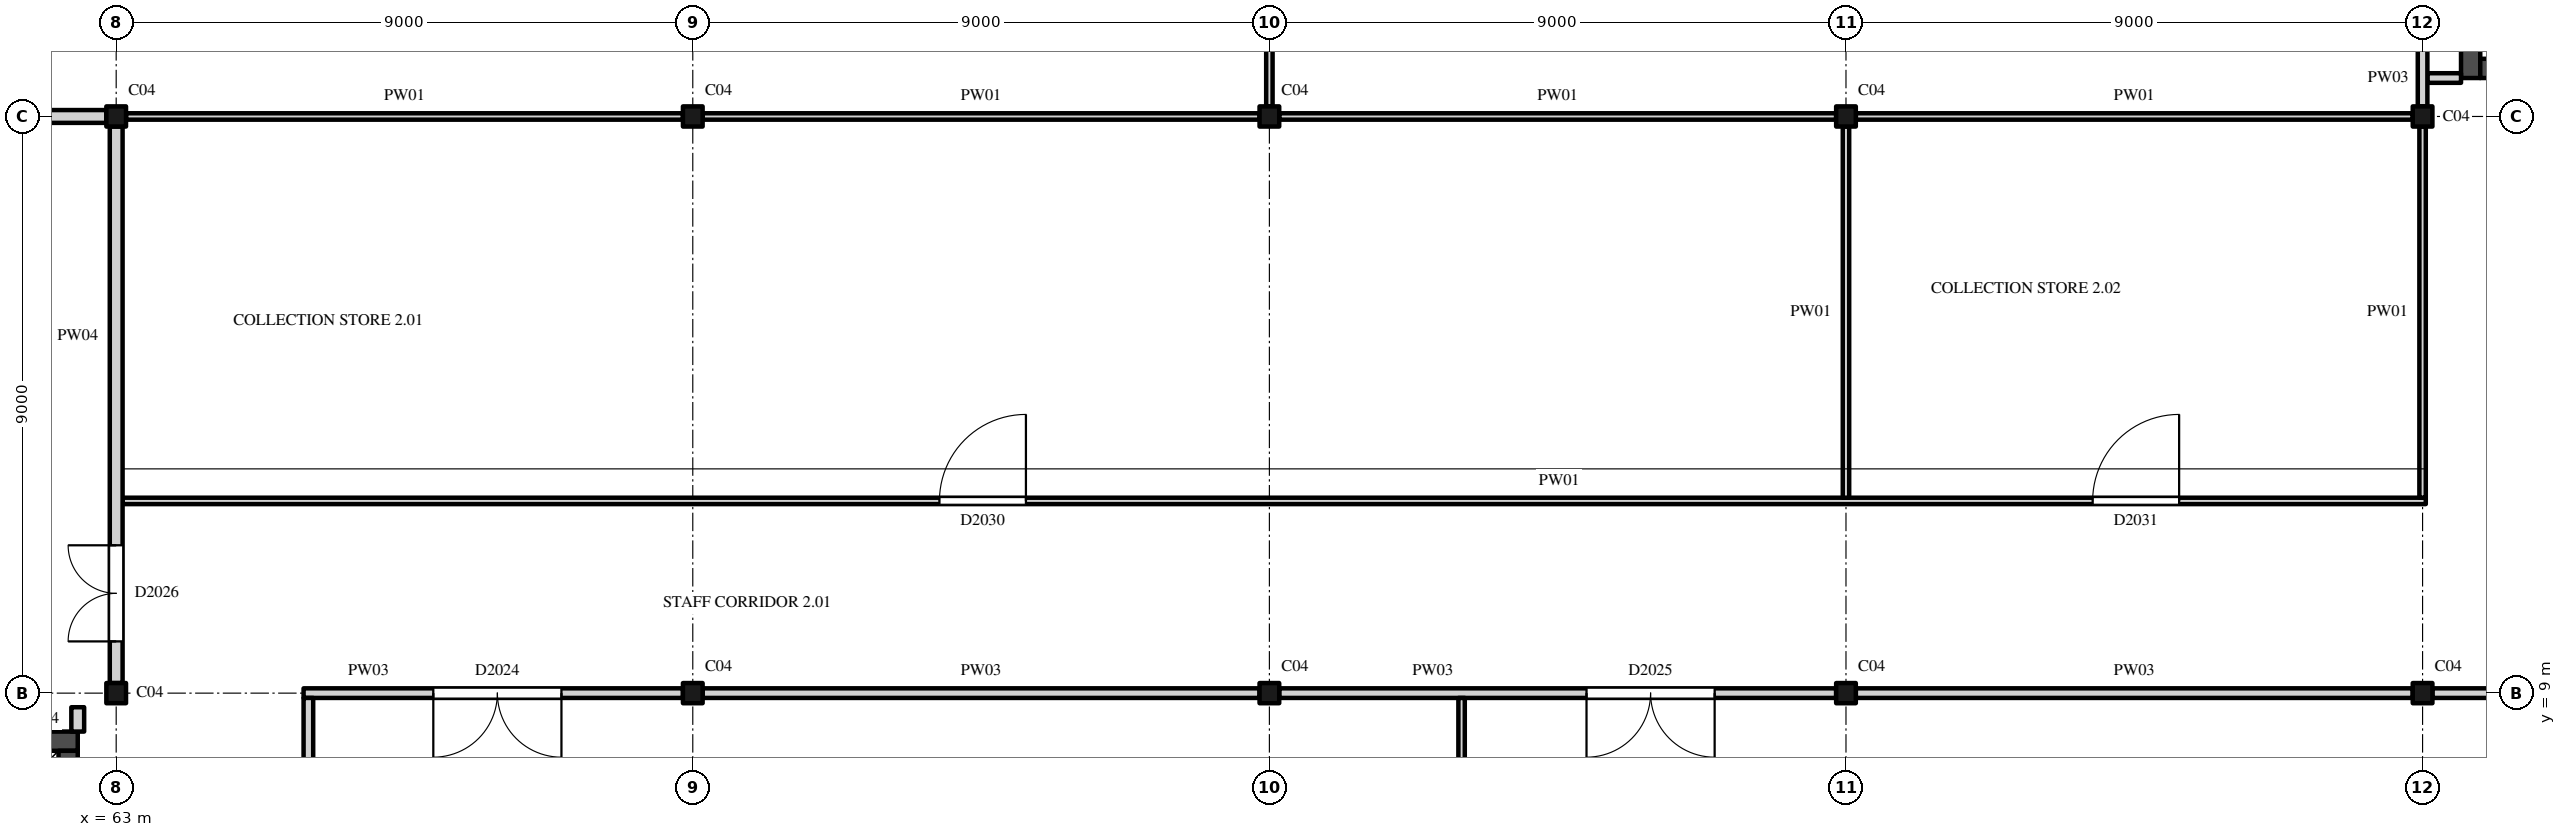
"""IFC4 building model, lengths in metres.
Left out: names, types, materials, properties, quantities, classifications, styles, units other than length and angle.
Written with IfcOpenShell. Run it as: python <this file> out.ifc"""

import sys

from ifc_helpers import new_model, si_unit, direction, frame, frame_2d, origin, origin_2d, place, context, subcontext, project, spatial, rectangle, i_section, extrude, element, fill, save


model = new_model("IFC4")
c1 = context("Model", 3, precision=1e-05, world=origin(), true_north=direction((0.0, 1.0)))
c2 = subcontext(c1, "Body", "Model", "MODEL_VIEW")
j1 = project(units=[si_unit("LENGTHUNIT", "METRE"), si_unit("PLANEANGLEUNIT", "RADIAN")], contexts=[c1])
p1 = place(None, origin())
s1 = spatial("IfcSite", under=j1, at=p1, CompositionType="ELEMENT")
p2 = place(p1, origin())
s2 = spatial("IfcBuilding", under=s1, at=p2, CompositionType="ELEMENT")
p3 = place(p2, frame((0.0, 0.0, 11.0)))
s3 = spatial("IfcBuildingStorey", under=s2, at=p3, CompositionType="ELEMENT", Elevation=11.0)
for number, where, z_axis, x_axis in (
    (1, (63.0, 9.0, 0.0), (0.0, 0.0, 1.0), (1.0, 0.0, 0.0)),
    (2, (72.0, 9.0, 0.0), (0.0, 0.0, 1.0), (1.0, 0.0, 0.0)),
    (3, (81.0, 9.0, 0.0), (0.0, 0.0, 1.0), (1.0, 0.0, 0.0)),
    (4, (90.0, 9.0, 0.0), (0.0, 0.0, 1.0), (1.0, 0.0, 0.0)),
    (5, (99.0, 9.0, 0.0), (0.0, 0.0, 1.0), (1.0, 0.0, 0.0)),
    (6, (63.0, 18.0, 0.0), (0.0, 0.0, 1.0), (1.0, 0.0, 0.0)),
    (7, (72.0, 18.0, 0.0), (0.0, 0.0, 1.0), (1.0, 0.0, 0.0)),
    (8, (81.0, 18.0, 0.0), (0.0, 0.0, 1.0), (1.0, 0.0, 0.0)),
    (9, (90.0, 18.0, 0.0), (0.0, 0.0, 1.0), (1.0, 0.0, 0.0)),
    (10, (99.0, 18.0, 0.0), (0.0, 0.0, 1.0), (1.0, 0.0, 0.0)),
):
    element("IfcColumn", number, at=place(p3, frame(where, z_axis=z_axis, x_axis=x_axis)), inside=s3, PredefinedType="COLUMN", context=c2, shape_type="SweptSolid", body=[
        extrude(i_section(OverallWidth=0.307, OverallDepth=0.315, WebThickness=0.012, FlangeThickness=0.019, FilletRadius=0.017, at=origin_2d()), origin(), (0.0, 0.0, 1.0), 5.0),
    ])
p4 = place(p3, frame((54.3, 8.25, 0.0), z_axis=(0.0, 0.0, 1.0), x_axis=(1.0, 0.0, 0.0)))
e11 = element("IfcWall", 11, at=p4, inside=s3, PredefinedType="SHEAR", context=c2, shape_type="SweptSolid", body=[
    extrude(rectangle(XDim=8.1, YDim=0.3, at=frame_2d((4.05, 0.0))), origin(), (0.0, 0.0, 1.0), 4.825),
])
p5 = place(p3, frame((62.25, 0.3, 0.0), z_axis=(0.0, 0.0, 1.0), x_axis=(0.0, 1.0, 0.0)))
e12 = element("IfcWall", 12, at=p5, inside=s3, PredefinedType="SHEAR", context=c2, shape_type="SweptSolid", body=[
    extrude(rectangle(XDim=7.8, YDim=0.3, at=frame_2d((3.9, 0.0))), origin(), (0.0, 0.0, 1.0), 4.825),
])
p6 = place(p5, frame((3.6, 0.0, 0.0)))
e13 = element("IfcOpeningElement", 13, at=p6, cuts=e12, PredefinedType="OPENING", context=c2, shape_type="SweptSolid", body=[
    extrude(rectangle(XDim=1.2, YDim=2.1, at=frame_2d((0.6, 1.05))), frame((0.0, 0.16, 0.0), z_axis=(0.0, -1.0, 0.0), x_axis=(1.0, 0.0, 0.0)), (0.0, 0.0, 1.0), 0.32),
])
p7 = place(p3, frame((99.75, 18.6, 0.0), z_axis=(0.0, 0.0, 1.0), x_axis=(0.0, 1.0, 0.0)))
e14 = element("IfcWall", 14, at=p7, inside=s3, PredefinedType="SHEAR", context=c2, shape_type="SweptSolid", body=[
    extrude(rectangle(XDim=4.8, YDim=0.3, at=frame_2d((2.4, 0.0))), origin(), (0.0, 0.0, 1.0), 4.825),
])
p8 = place(p3, frame((99.9, 18.75, 0.0), z_axis=(0.0, 0.0, 1.0), x_axis=(1.0, 0.0, 0.0)))
e15 = element("IfcWall", 15, at=p8, inside=s3, PredefinedType="SHEAR", context=c2, shape_type="SweptSolid", body=[
    extrude(rectangle(XDim=3.45, YDim=0.3, at=frame_2d((1.725, 0.0))), origin(), (0.0, 0.0, 1.0), 4.825),
])
p9 = place(p8, frame((0.6, 0.0, 0.0)))
e16 = element("IfcOpeningElement", 16, at=p9, cuts=e15, PredefinedType="OPENING", context=c2, shape_type="SweptSolid", body=[
    extrude(rectangle(XDim=2.1, YDim=2.4, at=frame_2d((1.05, 1.2))), frame((0.0, 0.16, 0.0), z_axis=(0.0, -1.0, 0.0), x_axis=(1.0, 0.0, 0.0)), (0.0, 0.0, 1.0), 0.32),
])
for number, where, z_axis, x_axis in (
    (17, (64.5, 11.325, 5.0), (0.0, 0.0, 1.0), (1.0, 0.0, 0.0)),
    (18, (64.5, 15.675, 5.0), (0.0, 0.0, 1.0), (1.0, 0.0, 0.0)),
):
    element("IfcWall", number, at=place(p3, frame(where, z_axis=z_axis, x_axis=x_axis)), inside=s3, PredefinedType="PARAPET", context=c2, shape_type="SweptSolid", body=[
        extrude(rectangle(XDim=6.0, YDim=0.15, at=frame_2d((3.0, 0.0))), origin(), (0.0, 0.0, 1.0), 0.5),
    ])
for number, where, z_axis, x_axis in (
    (19, (64.575, 11.4, 5.0), (0.0, 0.0, 1.0), (0.0, 1.0, 0.0)),
    (20, (70.425, 11.4, 5.0), (0.0, 0.0, 1.0), (0.0, 1.0, 0.0)),
):
    element("IfcWall", number, at=place(p3, frame(where, z_axis=z_axis, x_axis=x_axis)), inside=s3, PredefinedType="PARAPET", context=c2, shape_type="SweptSolid", body=[
        extrude(rectangle(XDim=4.2, YDim=0.15, at=frame_2d((2.1, 0.0))), origin(), (0.0, 0.0, 1.0), 0.5),
    ])
for number, where, z_axis, x_axis in (
    (21, (73.5, 11.325, 5.0), (0.0, 0.0, 1.0), (1.0, 0.0, 0.0)),
    (22, (73.5, 15.675, 5.0), (0.0, 0.0, 1.0), (1.0, 0.0, 0.0)),
):
    element("IfcWall", number, at=place(p3, frame(where, z_axis=z_axis, x_axis=x_axis)), inside=s3, PredefinedType="PARAPET", context=c2, shape_type="SweptSolid", body=[
        extrude(rectangle(XDim=6.0, YDim=0.15, at=frame_2d((3.0, 0.0))), origin(), (0.0, 0.0, 1.0), 0.5),
    ])
for number, where, z_axis, x_axis in (
    (23, (73.575, 11.4, 5.0), (0.0, 0.0, 1.0), (0.0, 1.0, 0.0)),
    (24, (79.425, 11.4, 5.0), (0.0, 0.0, 1.0), (0.0, 1.0, 0.0)),
):
    element("IfcWall", number, at=place(p3, frame(where, z_axis=z_axis, x_axis=x_axis)), inside=s3, PredefinedType="PARAPET", context=c2, shape_type="SweptSolid", body=[
        extrude(rectangle(XDim=4.2, YDim=0.15, at=frame_2d((2.1, 0.0))), origin(), (0.0, 0.0, 1.0), 0.5),
    ])
for number, where, z_axis, x_axis in (
    (25, (82.5, 11.325, 5.0), (0.0, 0.0, 1.0), (1.0, 0.0, 0.0)),
    (26, (82.5, 15.675, 5.0), (0.0, 0.0, 1.0), (1.0, 0.0, 0.0)),
):
    element("IfcWall", number, at=place(p3, frame(where, z_axis=z_axis, x_axis=x_axis)), inside=s3, PredefinedType="PARAPET", context=c2, shape_type="SweptSolid", body=[
        extrude(rectangle(XDim=6.0, YDim=0.15, at=frame_2d((3.0, 0.0))), origin(), (0.0, 0.0, 1.0), 0.5),
    ])
for number, where, z_axis, x_axis in (
    (27, (82.575, 11.4, 5.0), (0.0, 0.0, 1.0), (0.0, 1.0, 0.0)),
    (28, (88.425, 11.4, 5.0), (0.0, 0.0, 1.0), (0.0, 1.0, 0.0)),
):
    element("IfcWall", number, at=place(p3, frame(where, z_axis=z_axis, x_axis=x_axis)), inside=s3, PredefinedType="PARAPET", context=c2, shape_type="SweptSolid", body=[
        extrude(rectangle(XDim=4.2, YDim=0.15, at=frame_2d((2.1, 0.0))), origin(), (0.0, 0.0, 1.0), 0.5),
    ])
for number, where, z_axis, x_axis in (
    (29, (91.5, 11.325, 5.0), (0.0, 0.0, 1.0), (1.0, 0.0, 0.0)),
    (30, (91.5, 15.675, 5.0), (0.0, 0.0, 1.0), (1.0, 0.0, 0.0)),
):
    element("IfcWall", number, at=place(p3, frame(where, z_axis=z_axis, x_axis=x_axis)), inside=s3, PredefinedType="PARAPET", context=c2, shape_type="SweptSolid", body=[
        extrude(rectangle(XDim=6.0, YDim=0.15, at=frame_2d((3.0, 0.0))), origin(), (0.0, 0.0, 1.0), 0.5),
    ])
for number, where, z_axis, x_axis in (
    (31, (91.575, 11.4, 5.0), (0.0, 0.0, 1.0), (0.0, 1.0, 0.0)),
    (32, (97.425, 11.4, 5.0), (0.0, 0.0, 1.0), (0.0, 1.0, 0.0)),
):
    element("IfcWall", number, at=place(p3, frame(where, z_axis=z_axis, x_axis=x_axis)), inside=s3, PredefinedType="PARAPET", context=c2, shape_type="SweptSolid", body=[
        extrude(rectangle(XDim=4.2, YDim=0.15, at=frame_2d((2.1, 0.0))), origin(), (0.0, 0.0, 1.0), 0.5),
    ])
p10 = place(p3, frame((65.925, 9.0, 0.0), z_axis=(0.0, 0.0, 1.0), x_axis=(1.0, 0.0, 0.0)))
e33 = element("IfcWall", 33, at=p10, inside=s3, PredefinedType="PARTITIONING", context=c2, shape_type="SweptSolid", body=[
    extrude(rectangle(XDim=5.921, YDim=0.15, at=frame_2d((2.961, 0.0))), origin(), (0.0, 0.0, 1.0), 4.419),
])
p11 = place(p10, frame((2.025, 0.0, 0.0)))
e34 = element("IfcOpeningElement", 34, at=p11, cuts=e33, PredefinedType="OPENING", context=c2, shape_type="SweptSolid", body=[
    extrude(rectangle(XDim=2.0, YDim=2.4, at=frame_2d((1.0, 1.2))), frame((0.0, 0.085, 0.0), z_axis=(0.0, -1.0, 0.0), x_axis=(1.0, 0.0, 0.0)), (0.0, 0.0, 1.0), 0.17),
])
p12 = place(p3, frame((72.154, 9.0, 0.0), z_axis=(0.0, 0.0, 1.0), x_axis=(1.0, 0.0, 0.0)))
e35 = element("IfcWall", 35, at=p12, inside=s3, PredefinedType="PARTITIONING", context=c2, shape_type="SweptSolid", body=[
    extrude(rectangle(XDim=8.693, YDim=0.15, at=frame_2d((4.346, 0.0))), origin(), (0.0, 0.0, 1.0), 4.419),
])
p13 = place(p3, frame((81.154, 9.0, 0.0), z_axis=(0.0, 0.0, 1.0), x_axis=(1.0, 0.0, 0.0)))
e36 = element("IfcWall", 36, at=p13, inside=s3, PredefinedType="PARTITIONING", context=c2, shape_type="SweptSolid", body=[
    extrude(rectangle(XDim=8.693, YDim=0.15, at=frame_2d((4.346, 0.0))), origin(), (0.0, 0.0, 1.0), 4.419),
])
p14 = place(p13, frame((4.796, 0.0, 0.0)))
e37 = element("IfcOpeningElement", 37, at=p14, cuts=e36, PredefinedType="OPENING", context=c2, shape_type="SweptSolid", body=[
    extrude(rectangle(XDim=2.0, YDim=2.4, at=frame_2d((1.0, 1.2))), frame((0.0, 0.085, 0.0), z_axis=(0.0, -1.0, 0.0), x_axis=(1.0, 0.0, 0.0)), (0.0, 0.0, 1.0), 0.17),
])
p15 = place(p3, frame((90.154, 9.0, 0.0), z_axis=(0.0, 0.0, 1.0), x_axis=(1.0, 0.0, 0.0)))
e38 = element("IfcWall", 38, at=p15, inside=s3, PredefinedType="PARTITIONING", context=c2, shape_type="SweptSolid", body=[
    extrude(rectangle(XDim=8.693, YDim=0.15, at=frame_2d((4.346, 0.0))), origin(), (0.0, 0.0, 1.0), 4.419),
])
p16 = place(p3, frame((99.154, 9.0, 0.0), z_axis=(0.0, 0.0, 1.0), x_axis=(1.0, 0.0, 0.0)))
e39 = element("IfcWall", 39, at=p16, inside=s3, PredefinedType="PARTITIONING", context=c2, shape_type="SweptSolid", body=[
    extrude(rectangle(XDim=2.921, YDim=0.15, at=frame_2d((1.461, 0.0))), origin(), (0.0, 0.0, 1.0), 4.419),
])
p17 = place(p3, frame((63.1, 12.0, 0.0), z_axis=(0.0, 0.0, 1.0), x_axis=(1.0, 0.0, 0.0)))
e40 = element("IfcWall", 40, at=p17, inside=s3, PredefinedType="PARTITIONING", context=c2, shape_type="SweptSolid", body=[
    extrude(rectangle(XDim=35.95, YDim=0.1, at=frame_2d((17.975, 0.0))), origin(), (0.0, 0.0, 1.0), 4.422),
])
p18 = place(p17, frame((12.75, 0.0, 0.0)))
e41 = element("IfcOpeningElement", 41, at=p18, cuts=e40, PredefinedType="OPENING", context=c2, shape_type="SweptSolid", body=[
    extrude(rectangle(XDim=1.35, YDim=2.4, at=frame_2d((0.675, 1.2))), frame((0.0, 0.06, 0.0), z_axis=(0.0, -1.0, 0.0), x_axis=(1.0, 0.0, 0.0)), (0.0, 0.0, 1.0), 0.12),
])
p19 = place(p17, frame((30.75, 0.0, 0.0)))
e42 = element("IfcOpeningElement", 42, at=p19, cuts=e40, PredefinedType="OPENING", context=c2, shape_type="SweptSolid", body=[
    extrude(rectangle(XDim=1.35, YDim=2.4, at=frame_2d((0.675, 1.2))), frame((0.0, 0.06, 0.0), z_axis=(0.0, -1.0, 0.0), x_axis=(1.0, 0.0, 0.0)), (0.0, 0.0, 1.0), 0.12),
])
p20 = place(p3, frame((54.3, 18.0, 0.0), z_axis=(0.0, 0.0, 1.0), x_axis=(1.0, 0.0, 0.0)))
e43 = element("IfcWall", 43, at=p20, inside=s3, PredefinedType="PARTITIONING", context=c2, shape_type="SweptSolid", body=[
    extrude(rectangle(XDim=8.546, YDim=0.2, at=frame_2d((4.273, 0.0))), origin(), (0.0, 0.0, 1.0), 4.419),
])
for number, where, z_axis, x_axis in (
    (44, (63.154, 18.0, 0.0), (0.0, 0.0, 1.0), (1.0, 0.0, 0.0)),
    (45, (72.154, 18.0, 0.0), (0.0, 0.0, 1.0), (1.0, 0.0, 0.0)),
    (46, (81.154, 18.0, 0.0), (0.0, 0.0, 1.0), (1.0, 0.0, 0.0)),
    (47, (90.154, 18.0, 0.0), (0.0, 0.0, 1.0), (1.0, 0.0, 0.0)),
):
    element("IfcWall", number, at=place(p3, frame(where, z_axis=z_axis, x_axis=x_axis)), inside=s3, PredefinedType="PARTITIONING", context=c2, shape_type="SweptSolid", body=[
        extrude(rectangle(XDim=8.693, YDim=0.1, at=frame_2d((4.346, 0.0))), origin(), (0.0, 0.0, 1.0), 4.419),
    ])
p21 = place(p3, frame((99.075, 18.6, 0.0), z_axis=(0.0, 0.0, 1.0), x_axis=(1.0, 0.0, 0.0)))
e48 = element("IfcWall", 48, at=p21, inside=s3, PredefinedType="PARTITIONING", context=c2, shape_type="SweptSolid", body=[
    extrude(rectangle(XDim=0.525, YDim=0.15, at=frame_2d((0.263, 0.0))), origin(), (0.0, 0.0, 1.0), 4.825),
])
p22 = place(p3, frame((62.4, 8.4, 0.0), z_axis=(0.0, 0.0, 1.0), x_axis=(0.0, 1.0, 0.0)))
e49 = element("IfcWall", 49, at=p22, inside=s3, PredefinedType="PARTITIONING", context=c2, shape_type="SweptSolid", body=[
    extrude(rectangle(XDim=0.38, YDim=0.2, at=frame_2d((0.19, 0.0))), origin(), (0.0, 0.0, 1.0), 4.825),
])
p23 = place(p3, frame((63.0, 9.157, 0.0), z_axis=(0.0, 0.0, 1.0), x_axis=(0.0, 1.0, 0.0)))
e50 = element("IfcWall", 50, at=p23, inside=s3, PredefinedType="PARTITIONING", context=c2, shape_type="SweptSolid", body=[
    extrude(rectangle(XDim=8.686, YDim=0.2, at=frame_2d((4.343, 0.0))), origin(), (0.0, 0.0, 1.0), 4.297),
])
p24 = place(p23, frame((0.65, 0.0, 0.0)))
e51 = element("IfcOpeningElement", 51, at=p24, cuts=e50, PredefinedType="OPENING", context=c2, shape_type="SweptSolid", body=[
    extrude(rectangle(XDim=1.5, YDim=2.4, at=frame_2d((0.75, 1.2))), frame((0.0, 0.11, 0.0), z_axis=(0.0, -1.0, 0.0), x_axis=(1.0, 0.0, 0.0)), (0.0, 0.0, 1.0), 0.22),
])
p25 = place(p3, frame((66.0, 0.3, 0.0), z_axis=(0.0, 0.0, 1.0), x_axis=(0.0, 1.0, 0.0)))
e52 = element("IfcWall", 52, at=p25, inside=s3, PredefinedType="PARTITIONING", context=c2, shape_type="SweptSolid", body=[
    extrude(rectangle(XDim=8.625, YDim=0.15, at=frame_2d((4.312, 0.0))), origin(), (0.0, 0.0, 1.0), 4.825),
])
p26 = place(p3, frame((81.0, 18.157, 0.0), z_axis=(0.0, 0.0, 1.0), x_axis=(0.0, 1.0, 0.0)))
e53 = element("IfcWall", 53, at=p26, inside=s3, PredefinedType="PARTITIONING", context=c2, shape_type="SweptSolid", body=[
    extrude(rectangle(XDim=8.686, YDim=0.1, at=frame_2d((4.343, 0.0))), origin(), (0.0, 0.0, 1.0), 4.297),
])
p27 = place(p3, frame((84.0, 0.3, 0.0), z_axis=(0.0, 0.0, 1.0), x_axis=(0.0, 1.0, 0.0)))
e54 = element("IfcWall", 54, at=p27, inside=s3, PredefinedType="PARTITIONING", context=c2, shape_type="SweptSolid", body=[
    extrude(rectangle(XDim=8.625, YDim=0.1, at=frame_2d((4.312, 0.0))), origin(), (0.0, 0.0, 1.0), 4.825),
])
for number, where, z_axis, x_axis in (
    (55, (90.0, 12.05, 0.0), (0.0, 0.0, 1.0), (0.0, 1.0, 0.0)),
    (56, (99.0, 12.05, 0.0), (0.0, 0.0, 1.0), (0.0, 1.0, 0.0)),
):
    element("IfcWall", number, at=place(p3, frame(where, z_axis=z_axis, x_axis=x_axis)), inside=s3, PredefinedType="PARTITIONING", context=c2, shape_type="SweptSolid", body=[
        extrude(rectangle(XDim=5.793, YDim=0.1, at=frame_2d((2.896, 0.0))), origin(), (0.0, 0.0, 1.0), 4.297),
    ])
p28 = place(p3, frame((99.0, 18.157, 0.0), z_axis=(0.0, 0.0, 1.0), x_axis=(0.0, 1.0, 0.0)))
e57 = element("IfcWall", 57, at=p28, inside=s3, PredefinedType="PARTITIONING", context=c2, shape_type="SweptSolid", body=[
    extrude(rectangle(XDim=8.686, YDim=0.15, at=frame_2d((4.343, 0.0))), origin(), (0.0, 0.0, 1.0), 4.297),
])
p29 = place(p11, origin())
e58 = element("IfcDoor", 58, at=p29, inside=s3, OperationType="DOUBLE_DOOR_SINGLE_SWING", PredefinedType="DOOR", context=c2, shape_type="SweptSolid", body=[
    extrude(rectangle(XDim=2.0, YDim=2.4, at=frame_2d((1.0, 1.2))), frame((0.0, 0.025, 0.0), z_axis=(0.0, -1.0, 0.0), x_axis=(1.0, 0.0, 0.0)), (0.0, 0.0, 1.0), 0.05),
])
fill(e34, e58)
p30 = place(p14, origin())
e59 = element("IfcDoor", 59, at=p30, inside=s3, OperationType="DOUBLE_DOOR_SINGLE_SWING", PredefinedType="DOOR", context=c2, shape_type="SweptSolid", body=[
    extrude(rectangle(XDim=2.0, YDim=2.4, at=frame_2d((1.0, 1.2))), frame((0.0, 0.025, 0.0), z_axis=(0.0, -1.0, 0.0), x_axis=(1.0, 0.0, 0.0)), (0.0, 0.0, 1.0), 0.05),
])
fill(e37, e59)
p31 = place(p24, origin())
e60 = element("IfcDoor", 60, at=p31, inside=s3, OperationType="DOUBLE_DOOR_SINGLE_SWING", PredefinedType="DOOR", context=c2, shape_type="SweptSolid", body=[
    extrude(rectangle(XDim=1.5, YDim=2.4, at=frame_2d((0.75, 1.2))), frame((0.0, 0.025, 0.0), z_axis=(0.0, -1.0, 0.0), x_axis=(1.0, 0.0, 0.0)), (0.0, 0.0, 1.0), 0.05),
])
fill(e51, e60)
p32 = place(p18, origin())
e61 = element("IfcDoor", 61, at=p32, inside=s3, OperationType="SINGLE_SWING_LEFT", PredefinedType="DOOR", context=c2, shape_type="SweptSolid", body=[
    extrude(rectangle(XDim=1.35, YDim=2.4, at=frame_2d((0.675, 1.2))), frame((0.0, 0.025, 0.0), z_axis=(0.0, -1.0, 0.0), x_axis=(1.0, 0.0, 0.0)), (0.0, 0.0, 1.0), 0.05),
])
fill(e41, e61)
p33 = place(p19, origin())
e62 = element("IfcDoor", 62, at=p33, inside=s3, OperationType="SINGLE_SWING_LEFT", PredefinedType="DOOR", context=c2, shape_type="SweptSolid", body=[
    extrude(rectangle(XDim=1.35, YDim=2.4, at=frame_2d((0.675, 1.2))), frame((0.0, 0.025, 0.0), z_axis=(0.0, -1.0, 0.0), x_axis=(1.0, 0.0, 0.0)), (0.0, 0.0, 1.0), 0.05),
])
fill(e42, e62)
save(model, sys.argv[1])
